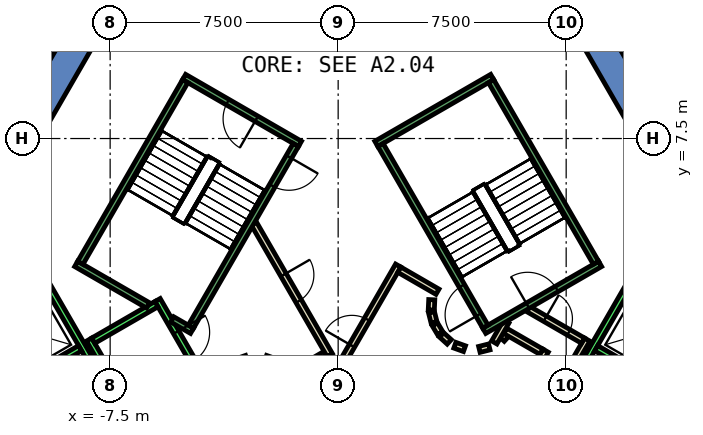
"""IFC4 building model, lengths in metres.
Left out: names, types, materials, properties, quantities, classifications, styles, units other than length and angle.
Written with IfcOpenShell. Run it as: python <this file> out.ifc"""

import sys

from ifc_helpers import new_model, si_unit, direction, frame, frame_2d, origin, place, context, subcontext, project, spatial, polyline, rectangle, outline, extrude, element, fill, save


model = new_model("IFC4")
c1 = context("Model", 3, precision=1e-05, world=origin(), true_north=direction((0.0, 1.0)))
c2 = subcontext(c1, "Body", "Model", "MODEL_VIEW")
j1 = project(units=[si_unit("LENGTHUNIT", "METRE"), si_unit("PLANEANGLEUNIT", "RADIAN")], contexts=[c1])
p1 = place(None, origin())
s1 = spatial("IfcSite", under=j1, at=p1, CompositionType="ELEMENT")
p2 = place(p1, origin())
s2 = spatial("IfcBuilding", under=s1, at=p2, CompositionType="ELEMENT")
p3 = place(p2, origin())
s3 = spatial("IfcBuildingStorey", under=s2, at=p3, CompositionType="ELEMENT", Elevation=0.0)
p4 = place(p3, frame((0.0, 0.0, -0.5)))
e1 = element("IfcWall", 1, at=p4, inside=s3, PredefinedType="SHEAR", context=c2, shape_type="SweptSolid", body=[
    extrude(outline(polyline([(8.517, 11.748), (7.651, 11.248), (12.702, 2.5), (13.856, 2.5), (8.517, 11.748)])), origin(), (0.0, 0.0, 1.0), 9.05),
])
p5 = place(p3, frame((0.0, 0.0, -0.5)))
e2 = element("IfcWall", 2, at=p5, inside=s3, PredefinedType="SHEAR", context=c2, shape_type="SweptSolid", body=[
    extrude(outline(polyline([(-12.267, 5.252), (-11.402, 4.752), (-6.351, 13.5), (-6.928, 14.5), (-12.267, 5.252)])), origin(), (0.0, 0.0, 1.0), 9.05),
])
p6 = place(p3, frame((5.39, 0.898, 0.0), z_axis=(0.0, 0.0, 1.0), x_axis=(0.673828488714, 0.738887791073, 0.0)))
e3 = element("IfcWall", 3, at=p6, inside=s3, PredefinedType="PARTITIONING", context=c2, shape_type="SweptSolid", body=[
    extrude(rectangle(XDim=0.263, YDim=0.2, at=frame_2d((0.131, 0.0))), origin(), (0.0, 0.0, 1.0), 8.55),
])
p7 = place(p3, frame((5.499, 1.172, 0.0), z_axis=(0.0, 0.0, 1.0), x_axis=(0.866333505267, -0.499465972466, 0.0)))
e4 = element("IfcWall", 4, at=p7, inside=s3, PredefinedType="PARTITIONING", context=c2, shape_type="SweptSolid", body=[
    extrude(rectangle(XDim=1.374, YDim=0.2, at=frame_2d((0.687, 0.0))), origin(), (0.0, 0.0, 1.0), 8.55),
])
p8 = place(p3, frame((6.826, 0.522, 0.0), z_axis=(0.0, 0.0, 1.0), x_axis=(-0.500016722714, -0.866015748706, 0.0)))
e5 = element("IfcWall", 5, at=p8, inside=s3, PredefinedType="PARTITIONING", context=c2, shape_type="SweptSolid", body=[
    extrude(rectangle(XDim=1.7, YDim=0.2, at=frame_2d((0.85, 0.0))), origin(), (0.0, 0.0, 1.0), 8.55),
])
p9 = place(p3, frame((8.192, 0.888, 0.0), z_axis=(0.0, 0.0, 1.0), x_axis=(-0.499940625693, -0.866059680843, 0.0)))
e6 = element("IfcWall", 6, at=p9, inside=s3, PredefinedType="PARTITIONING", context=c2, shape_type="SweptSolid", body=[
    extrude(rectangle(XDim=2.68, YDim=0.2, at=frame_2d((1.34, 0.0))), origin(), (0.0, 0.0, 1.0), 8.55),
])
p10 = place(p3, frame((5.135, 0.793, 0.0), z_axis=(0.0, 0.0, 1.0), x_axis=(0.499526442893, 0.866298639529, 0.0)))
e7 = element("IfcWall", 7, at=p10, inside=s3, PredefinedType="PARTITIONING", context=c2, shape_type="SweptSolid", body=[
    extrude(rectangle(XDim=0.791, YDim=0.2, at=frame_2d((0.396, 0.0))), origin(), (0.0, 0.0, 1.0), 8.55),
])
p11 = place(p3, frame((6.25, 1.894, 0.0), z_axis=(0.0, 0.0, 1.0), x_axis=(0.866043184279, -0.499969202016, 0.0)))
e8 = element("IfcWall", 8, at=p11, inside=s3, PredefinedType="PARTITIONING", context=c2, shape_type="SweptSolid", body=[
    extrude(rectangle(XDim=2.084, YDim=0.2, at=frame_2d((1.042, 0.0))), origin(), (0.0, 0.0, 1.0), 8.55),
])
p12 = place(p11, frame((0.642, 0.0, 0.0)))
e9 = element("IfcOpeningElement", 9, at=p12, cuts=e8, PredefinedType="OPENING", context=c2, shape_type="SweptSolid", body=[
    extrude(rectangle(XDim=0.9, YDim=2.1, at=frame_2d((0.45, 1.05))), frame((0.0, 0.11, 0.0), z_axis=(0.0, -1.0, 0.0), x_axis=(1.0, 0.0, 0.0)), (0.0, 0.0, 1.0), 0.22),
])
p13 = place(p3, frame((3.079, 2.199, 0.0), z_axis=(0.0, 0.0, 1.0), x_axis=(-0.047771483479, -0.998858290933, 0.0)))
e10 = element("IfcWall", 10, at=p13, inside=s3, PredefinedType="PARTITIONING", context=c2, shape_type="SweptSolid", body=[
    extrude(rectangle(XDim=0.337, YDim=0.2, at=frame_2d((0.169, 0.0))), origin(), (0.0, 0.0, 1.0), 8.55),
])
p14 = place(p3, frame((3.07, 1.786, 0.0), z_axis=(0.0, 0.0, 1.0), x_axis=(0.242705583207, -0.970099994784, 0.0)))
e11 = element("IfcWall", 11, at=p14, inside=s3, PredefinedType="PARTITIONING", context=c2, shape_type="SweptSolid", body=[
    extrude(rectangle(XDim=0.338, YDim=0.2, at=frame_2d((0.169, 0.0))), origin(), (0.0, 0.0, 1.0), 8.55),
])
for number, where, z_axis, x_axis in (
    (12, (3.182, 1.388, 0.0), (0.0, 0.0, 1.0), (0.512, -0.859, 0.0)),
    (13, (3.404, 1.039, 0.0), (0.0, 0.0, 1.0), (0.74, -0.672, 0.0)),
):
    element("IfcWall", number, at=place(p3, frame(where, z_axis=z_axis, x_axis=x_axis)), inside=s3, PredefinedType="PARTITIONING", context=c2, shape_type="SweptSolid", body=[
        extrude(rectangle(XDim=0.338, YDim=0.2, at=frame_2d((0.169, 0.0))), origin(), (0.0, 0.0, 1.0), 8.55),
    ])
p15 = place(p3, frame((3.838, 0.702, 0.0), z_axis=(0.0, 0.0, 1.0), x_axis=(0.941035081519, -0.338308993895, 0.0)))
e14 = element("IfcWall", 14, at=p15, inside=s3, PredefinedType="PARTITIONING", context=c2, shape_type="SweptSolid", body=[
    extrude(rectangle(XDim=0.337, YDim=0.2, at=frame_2d((0.168, 0.0))), origin(), (0.0, 0.0, 1.0), 8.55),
])
p16 = place(p3, frame((4.644, 0.564, 0.0), z_axis=(0.0, 0.0, 1.0), x_axis=(0.969929076366, 0.243387729394, 0.0)))
e15 = element("IfcWall", 15, at=p16, inside=s3, PredefinedType="PARTITIONING", context=c2, shape_type="SweptSolid", body=[
    extrude(rectangle(XDim=0.337, YDim=0.2, at=frame_2d((0.168, 0.0))), origin(), (0.0, 0.0, 1.0), 8.55),
])
p17 = place(p3, frame((-0.52, -1.0, 0.0), z_axis=(0.0, 0.0, 1.0), x_axis=(0.50011622646, 0.865958290007, 0.0)))
e16 = element("IfcWall", 16, at=p17, inside=s3, PredefinedType="PARTITIONING", context=c2, shape_type="SweptSolid", body=[
    extrude(rectangle(XDim=4.991, YDim=0.2, at=frame_2d((2.496, 0.0))), origin(), (0.0, 0.0, 1.0), 8.55),
])
p18 = place(p17, frame((1.945, 0.0, 0.0)))
e17 = element("IfcOpeningElement", 17, at=p18, cuts=e16, PredefinedType="OPENING", context=c2, shape_type="SweptSolid", body=[
    extrude(rectangle(XDim=1.0, YDim=2.1, at=frame_2d((0.5, 1.05))), frame((0.0, 0.11, 0.0), z_axis=(0.0, -1.0, 0.0), x_axis=(1.0, 0.0, 0.0)), (0.0, 0.0, 1.0), 0.22),
])
p19 = place(p3, frame((2.012, 3.186, 0.0), z_axis=(0.0, 0.0, 1.0), x_axis=(0.865891012941, -0.500232699559, 0.0)))
e18 = element("IfcWall", 18, at=p19, inside=s3, PredefinedType="PARTITIONING", context=c2, shape_type="SweptSolid", body=[
    extrude(rectangle(XDim=1.449, YDim=0.2, at=frame_2d((0.725, 0.0))), origin(), (0.0, 0.0, 1.0), 8.55),
])
p20 = place(p3, frame((-0.412, 0.414, 0.0), z_axis=(0.0, 0.0, 1.0), x_axis=(-0.866017369001, -0.500013916395, 0.0)))
e19 = element("IfcWall", 19, at=p20, inside=s3, PredefinedType="PARTITIONING", context=c2, shape_type="SweptSolid", body=[
    extrude(rectangle(XDim=1.45, YDim=0.2, at=frame_2d((0.725, 0.0))), origin(), (0.0, 0.0, 1.0), 8.55),
])
p21 = place(p3, frame((-2.07, 0.16, 0.0), z_axis=(0.0, 0.0, 1.0), x_axis=(-0.942199461132, 0.335052496547, 0.0)))
e20 = element("IfcWall", 20, at=p21, inside=s3, PredefinedType="PARTITIONING", context=c2, shape_type="SweptSolid", body=[
    extrude(rectangle(XDim=0.337, YDim=0.2, at=frame_2d((0.169, 0.0))), origin(), (0.0, 0.0, 1.0), 8.55),
])
p22 = place(p3, frame((-3.012, 0.273, 0.0), z_axis=(0.0, 0.0, 1.0), x_axis=(-0.942280615813, -0.334824194261, 0.0)))
e21 = element("IfcWall", 21, at=p22, inside=s3, PredefinedType="PARTITIONING", context=c2, shape_type="SweptSolid", body=[
    extrude(rectangle(XDim=0.338, YDim=0.2, at=frame_2d((0.169, 0.0))), origin(), (0.0, 0.0, 1.0), 8.55),
])
p23 = place(p3, frame((-2.771, 4.7, 0.0), z_axis=(0.0, 0.0, 1.0), x_axis=(0.499969479948, -0.866043023828, 0.0)))
e22 = element("IfcWall", 22, at=p23, inside=s3, PredefinedType="PARTITIONING", context=c2, shape_type="SweptSolid", body=[
    extrude(rectangle(XDim=4.99, YDim=0.2, at=frame_2d((2.495, 0.0))), origin(), (0.0, 0.0, 1.0), 8.55),
])
p24 = place(p23, frame((1.945, 0.0, 0.0)))
e23 = element("IfcOpeningElement", 23, at=p24, cuts=e22, PredefinedType="OPENING", context=c2, shape_type="SweptSolid", body=[
    extrude(rectangle(XDim=1.0, YDim=2.1, at=frame_2d((0.5, 1.05))), frame((0.0, 0.11, 0.0), z_axis=(0.0, -1.0, 0.0), x_axis=(1.0, 0.0, 0.0)), (0.0, 0.0, 1.0), 0.22),
])
p25 = place(p3, frame((-18.107, 2.457, 0.0), z_axis=(0.0, 0.0, 1.0), x_axis=(0.499997929316, 0.866026599291, 0.0)))
e24 = element("IfcWall", 24, at=p25, inside=s3, PredefinedType="PARTITIONING", context=c2, shape_type="SweptSolid", body=[
    extrude(rectangle(XDim=18.182, YDim=0.1, at=frame_2d((9.091, 0.0))), origin(), (0.0, 0.0, 1.0), 8.55),
])
p26 = place(p25, frame((4.754, 0.0, 0.0)))
e25 = element("IfcOpeningElement", 25, at=p26, cuts=e24, PredefinedType="OPENING", context=c2, shape_type="SweptSolid", body=[
    extrude(rectangle(XDim=1.8, YDim=2.1, at=frame_2d((0.9, 1.05))), frame((0.0, 0.06, 0.0), z_axis=(0.0, -1.0, 0.0), x_axis=(1.0, 0.0, 0.0)), (0.0, 0.0, 1.0), 0.12),
])
p27 = place(p3, frame((-7.104, 16.539, 0.0), z_axis=(0.0, 0.0, 1.0), x_axis=(-0.508323844405, -0.861165993992, 0.0)))
e26 = element("IfcWall", 26, at=p27, inside=s3, PredefinedType="PARTITIONING", context=c2, shape_type="SweptSolid", body=[
    extrude(rectangle(XDim=7.182, YDim=0.15, at=frame_2d((3.591, 0.0))), origin(), (0.0, 0.0, 1.0), 8.55),
])
p28 = place(p3, frame((-5.94, 2.188, 0.0), z_axis=(0.0, 0.0, 1.0), x_axis=(0.49994636267, -0.866056369097, 0.0)))
e27 = element("IfcWall", 27, at=p28, inside=s3, PredefinedType="STANDARD", context=c2, shape_type="SweptSolid", body=[
    extrude(rectangle(XDim=2.8, YDim=0.2, at=frame_2d((1.4, 0.0))), origin(), (0.0, 0.0, 1.0), 8.55),
])
p29 = place(p28, frame((1.225, 0.0, 0.0)))
e28 = element("IfcOpeningElement", 28, at=p29, cuts=e27, PredefinedType="OPENING", context=c2, shape_type="SweptSolid", body=[
    extrude(rectangle(XDim=1.1, YDim=2.1, at=frame_2d((0.55, 1.05))), frame((0.0, 0.11, 0.0), z_axis=(0.0, -1.0, 0.0), x_axis=(1.0, 0.0, 0.0)), (0.0, 0.0, 1.0), 0.22),
])
p30 = place(p3, frame((-8.192, 0.888, 0.0), z_axis=(0.0, 0.0, 1.0), x_axis=(0.49994636267, -0.866056369097, 0.0)))
e29 = element("IfcWall", 29, at=p30, inside=s3, PredefinedType="STANDARD", context=c2, shape_type="SweptSolid", body=[
    extrude(rectangle(XDim=2.8, YDim=0.2, at=frame_2d((1.4, 0.0))), origin(), (0.0, 0.0, 1.0), 8.55),
])
p31 = place(p3, frame((-5.977, 2.052, 0.0), z_axis=(0.0, 0.0, 1.0), x_axis=(-0.865973769406, -0.500089422704, 0.0)))
e30 = element("IfcWall", 30, at=p31, inside=s3, PredefinedType="STANDARD", context=c2, shape_type="SweptSolid", body=[
    extrude(rectangle(XDim=2.399, YDim=0.2, at=frame_2d((1.2, 0.0))), origin(), (0.0, 0.0, 1.0), 8.55),
])
p32 = place(p3, frame((-9.751, 2.99, 0.0), z_axis=(0.0, 0.0, 1.0), x_axis=(0.50000090737, -0.866024879913, 0.0)))
e31 = element("IfcWall", 31, at=p32, inside=s3, PredefinedType="STANDARD", context=c2, shape_type="SweptSolid", body=[
    extrude(rectangle(XDim=10.6, YDim=0.2, at=frame_2d((5.3, 0.0))), origin(), (0.0, 0.0, 1.0), 8.55),
])
p33 = place(p3, frame((-8.488, 0.602, 0.0), z_axis=(0.0, 0.0, 1.0), x_axis=(-0.866022959057, -0.500004234368, 0.0)))
e32 = element("IfcWall", 32, at=p33, inside=s3, PredefinedType="STANDARD", context=c2, shape_type="SweptSolid", body=[
    extrude(rectangle(XDim=2.5, YDim=0.2, at=frame_2d((1.25, 0.0))), origin(), (0.0, 0.0, 1.0), 8.55),
])
p34 = place(p3, frame((4.451, -6.19, 0.0), z_axis=(0.0, 0.0, 1.0), x_axis=(0.50000090737, 0.866024879913, 0.0)))
e33 = element("IfcWall", 33, at=p34, inside=s3, PredefinedType="STANDARD", context=c2, shape_type="SweptSolid", body=[
    extrude(rectangle(XDim=10.6, YDim=0.2, at=frame_2d((5.3, 0.0))), origin(), (0.0, 0.0, 1.0), 8.55),
])
p35 = place(p3, frame((8.488, 0.602, 0.0), z_axis=(0.0, 0.0, 1.0), x_axis=(0.866022959057, -0.500004234368, 0.0)))
e34 = element("IfcWall", 34, at=p35, inside=s3, PredefinedType="STANDARD", context=c2, shape_type="SweptSolid", body=[
    extrude(rectangle(XDim=2.5, YDim=0.2, at=frame_2d((1.25, 0.0))), origin(), (0.0, 0.0, 1.0), 8.55),
])
p36 = place(p3, frame((4.806, 1.176, 0.0), z_axis=(0.0, 0.0, 1.0), x_axis=(0.866059941101, 0.499940174841, 0.0)))
e35 = element("IfcWall", 35, at=p36, inside=s3, PredefinedType="STANDARD", context=c2, shape_type="SweptSolid", body=[
    extrude(rectangle(XDim=4.4, YDim=0.2, at=frame_2d((2.2, 0.0))), origin(), (0.0, 0.0, 1.0), 8.55),
])
p37 = place(p36, frame((1.65, 0.0, 0.0)))
e36 = element("IfcOpeningElement", 36, at=p37, cuts=e35, PredefinedType="OPENING", context=c2, shape_type="SweptSolid", body=[
    extrude(rectangle(XDim=1.1, YDim=2.2, at=frame_2d((0.55, 1.1))), frame((0.0, 0.11, 0.0), z_axis=(0.0, -1.0, 0.0), x_axis=(1.0, 0.0, 0.0)), (0.0, 0.0, 1.0), 0.22),
])
p38 = place(p3, frame((1.256, 7.324, 0.0), z_axis=(0.0, 0.0, 1.0), x_axis=(0.866046073146, 0.499964197906, 0.0)))
e37 = element("IfcWall", 37, at=p38, inside=s3, PredefinedType="STANDARD", context=c2, shape_type="SweptSolid", body=[
    extrude(rectangle(XDim=4.4, YDim=0.2, at=frame_2d((2.2, 0.0))), origin(), (0.0, 0.0, 1.0), 8.55),
])
p39 = place(p3, frame((4.843, 1.312, 0.0), z_axis=(0.0, 0.0, 1.0), x_axis=(-0.499963383562, 0.866046543262, 0.0)))
e38 = element("IfcWall", 38, at=p39, inside=s3, PredefinedType="STANDARD", context=c2, shape_type="SweptSolid", body=[
    extrude(rectangle(XDim=6.9, YDim=0.2, at=frame_2d((3.45, 0.0))), origin(), (0.0, 0.0, 1.0), 8.55),
])
p40 = place(p39, frame((0.45, 0.0, 0.0)))
e39 = element("IfcOpeningElement", 39, at=p40, cuts=e38, PredefinedType="OPENING", context=c2, shape_type="SweptSolid", body=[
    extrude(rectangle(XDim=1.1, YDim=2.2, at=frame_2d((0.55, 1.1))), frame((0.0, 0.11, 0.0), z_axis=(0.0, -1.0, 0.0), x_axis=(1.0, 0.0, 0.0)), (0.0, 0.0, 1.0), 0.22),
])
p41 = place(p3, frame((8.48, 3.412, 0.0), z_axis=(0.0, 0.0, 1.0), x_axis=(-0.499978703459, 0.866037698999, 0.0)))
e40 = element("IfcWall", 40, at=p41, inside=s3, PredefinedType="STANDARD", context=c2, shape_type="SweptSolid", body=[
    extrude(rectangle(XDim=6.9, YDim=0.2, at=frame_2d((3.45, 0.0))), origin(), (0.0, 0.0, 1.0), 8.55),
])
p42 = place(p3, frame((-1.256, 7.324, 0.0), z_axis=(0.0, 0.0, 1.0), x_axis=(-0.866046073146, 0.499964197906, 0.0)))
e41 = element("IfcWall", 41, at=p42, inside=s3, PredefinedType="STANDARD", context=c2, shape_type="SweptSolid", body=[
    extrude(rectangle(XDim=4.4, YDim=0.2, at=frame_2d((2.2, 0.0))), origin(), (0.0, 0.0, 1.0), 8.55),
])
p43 = place(p42, frame((1.65, 0.0, 0.0)))
e42 = element("IfcOpeningElement", 42, at=p43, cuts=e41, PredefinedType="OPENING", context=c2, shape_type="SweptSolid", body=[
    extrude(rectangle(XDim=1.1, YDim=2.2, at=frame_2d((0.55, 1.1))), frame((0.0, 0.11, 0.0), z_axis=(0.0, -1.0, 0.0), x_axis=(1.0, 0.0, 0.0)), (0.0, 0.0, 1.0), 0.22),
])
p44 = place(p3, frame((-6.25, 2.01, 0.0), z_axis=(0.0, 0.0, 1.0), x_axis=(-0.86611865017, 0.499838457731, 0.0)))
e43 = element("IfcWall", 43, at=p44, inside=s3, PredefinedType="STANDARD", context=c2, shape_type="SweptSolid", body=[
    extrude(rectangle(XDim=2.733, YDim=0.2, at=frame_2d((1.366, 0.0))), origin(), (0.0, 0.0, 1.0), 8.55),
])
p45 = place(p3, frame((-4.806, 1.176, 0.0), z_axis=(0.0, 0.0, 1.0), x_axis=(-0.866558586415, 0.499075361355, 0.0)))
e44 = element("IfcWall", 44, at=p45, inside=s3, PredefinedType="STANDARD", context=c2, shape_type="SweptSolid", body=[
    extrude(rectangle(XDim=0.751, YDim=0.2, at=frame_2d((0.376, 0.0))), origin(), (0.0, 0.0, 1.0), 8.55),
])
p46 = place(p3, frame((-1.393, 7.288, 0.0), z_axis=(0.0, 0.0, 1.0), x_axis=(-0.499963383562, -0.866046543262, 0.0)))
e45 = element("IfcWall", 45, at=p46, inside=s3, PredefinedType="STANDARD", context=c2, shape_type="SweptSolid", body=[
    extrude(rectangle(XDim=6.9, YDim=0.2, at=frame_2d((3.45, 0.0))), origin(), (0.0, 0.0, 1.0), 8.55),
])
p47 = place(p46, frame((0.45, 0.0, 0.0)))
e46 = element("IfcOpeningElement", 46, at=p47, cuts=e45, PredefinedType="OPENING", context=c2, shape_type="SweptSolid", body=[
    extrude(rectangle(XDim=1.1, YDim=2.2, at=frame_2d((0.55, 1.1))), frame((0.0, 0.11, 0.0), z_axis=(0.0, -1.0, 0.0), x_axis=(1.0, 0.0, 0.0)), (0.0, 0.0, 1.0), 0.22),
])
p48 = place(p3, frame((-5.03, 9.388, 0.0), z_axis=(0.0, 0.0, 1.0), x_axis=(-0.499978703459, -0.866037698999, 0.0)))
e47 = element("IfcWall", 47, at=p48, inside=s3, PredefinedType="STANDARD", context=c2, shape_type="SweptSolid", body=[
    extrude(rectangle(XDim=6.9, YDim=0.2, at=frame_2d((3.45, 0.0))), origin(), (0.0, 0.0, 1.0), 8.55),
])
p49 = place(p18, origin())
e48 = element("IfcDoor", 48, at=p49, inside=s3, OperationType="SINGLE_SWING_LEFT", PredefinedType="DOOR", context=c2, shape_type="SweptSolid", body=[
    extrude(rectangle(XDim=1.0, YDim=2.1, at=frame_2d((0.5, 1.05))), frame((0.0, 0.025, 0.0), z_axis=(0.0, -1.0, 0.0), x_axis=(1.0, 0.0, 0.0)), (0.0, 0.0, 1.0), 0.05),
])
fill(e17, e48)
p50 = place(p24, origin())
e49 = element("IfcDoor", 49, at=p50, inside=s3, OperationType="SINGLE_SWING_RIGHT", PredefinedType="DOOR", context=c2, shape_type="SweptSolid", body=[
    extrude(rectangle(XDim=1.0, YDim=2.1, at=frame_2d((0.5, 1.05))), frame((0.0, 0.025, 0.0), z_axis=(0.0, -1.0, 0.0), x_axis=(1.0, 0.0, 0.0)), (0.0, 0.0, 1.0), 0.05),
])
fill(e23, e49)
p51 = place(p12, origin())
e50 = element("IfcDoor", 50, at=p51, inside=s3, OperationType="SINGLE_SWING_LEFT", PredefinedType="DOOR", context=c2, shape_type="SweptSolid", body=[
    extrude(rectangle(XDim=0.9, YDim=2.1, at=frame_2d((0.45, 1.05))), frame((0.0, 0.025, 0.0), z_axis=(0.0, -1.0, 0.0), x_axis=(1.0, 0.0, 0.0)), (0.0, 0.0, 1.0), 0.05),
])
fill(e9, e50)
p52 = place(p29, origin())
e51 = element("IfcDoor", 51, at=p52, inside=s3, OperationType="SLIDING_TO_LEFT", PredefinedType="DOOR", context=c2, shape_type="SweptSolid", body=[
    extrude(rectangle(XDim=1.1, YDim=2.1, at=frame_2d((0.55, 1.05))), frame((0.0, 0.025, 0.0), z_axis=(0.0, -1.0, 0.0), x_axis=(1.0, 0.0, 0.0)), (0.0, 0.0, 1.0), 0.05),
])
fill(e28, e51)
p53 = place(p40, origin())
e52 = element("IfcDoor", 52, at=p53, inside=s3, OperationType="SINGLE_SWING_LEFT", PredefinedType="DOOR", context=c2, shape_type="SweptSolid", body=[
    extrude(rectangle(XDim=1.1, YDim=2.2, at=frame_2d((0.55, 1.1))), frame((0.0, 0.025, 0.0), z_axis=(0.0, -1.0, 0.0), x_axis=(1.0, 0.0, 0.0)), (0.0, 0.0, 1.0), 0.05),
])
fill(e39, e52)
p54 = place(p37, origin())
e53 = element("IfcDoor", 53, at=p54, inside=s3, OperationType="SINGLE_SWING_LEFT", PredefinedType="DOOR", context=c2, shape_type="SweptSolid", body=[
    extrude(rectangle(XDim=1.1, YDim=2.2, at=frame_2d((0.55, 1.1))), frame((0.0, 0.025, 0.0), z_axis=(0.0, -1.0, 0.0), x_axis=(1.0, 0.0, 0.0)), (0.0, 0.0, 1.0), 0.05),
])
fill(e36, e53)
p55 = place(p47, origin())
e54 = element("IfcDoor", 54, at=p55, inside=s3, OperationType="SINGLE_SWING_LEFT", PredefinedType="DOOR", context=c2, shape_type="SweptSolid", body=[
    extrude(rectangle(XDim=1.1, YDim=2.2, at=frame_2d((0.55, 1.1))), frame((0.0, 0.025, 0.0), z_axis=(0.0, -1.0, 0.0), x_axis=(1.0, 0.0, 0.0)), (0.0, 0.0, 1.0), 0.05),
])
fill(e46, e54)
p56 = place(p43, origin())
e55 = element("IfcDoor", 55, at=p56, inside=s3, OperationType="SINGLE_SWING_LEFT", PredefinedType="DOOR", context=c2, shape_type="SweptSolid", body=[
    extrude(rectangle(XDim=1.1, YDim=2.2, at=frame_2d((0.55, 1.1))), frame((0.0, 0.025, 0.0), z_axis=(0.0, -1.0, 0.0), x_axis=(1.0, 0.0, 0.0)), (0.0, 0.0, 1.0), 0.05),
])
fill(e42, e55)
save(model, sys.argv[1])
